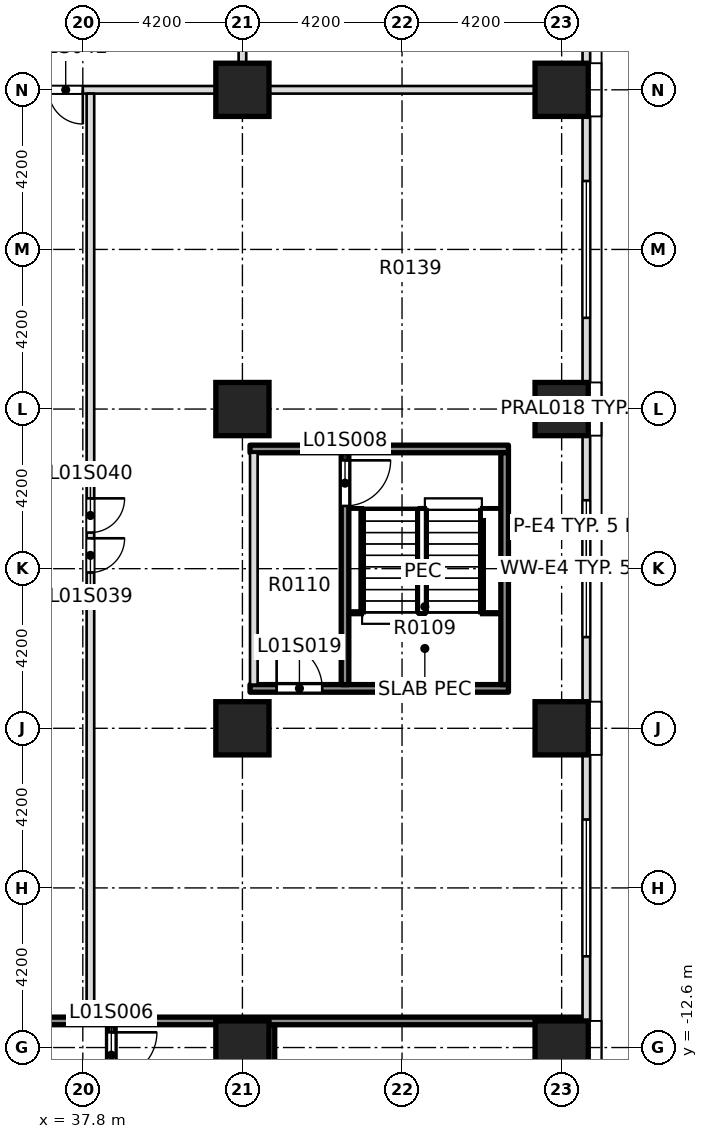
"""IFC4 building model, lengths in metres.
Left out: names, types, materials, properties, quantities, classifications, styles, units other than length and angle.
Written with IfcOpenShell. Run it as: python <this file> out.ifc"""

import sys

from ifc_helpers import new_model, si_unit, direction, frame, frame_2d, origin, origin_2d, place, context, subcontext, project, spatial, rectangle, extrude, element, fill, save


model = new_model("IFC4")
c1 = context("Model", 3, precision=1e-05, world=origin(), true_north=direction((0.0, 1.0)))
c2 = subcontext(c1, "Body", "Model", "MODEL_VIEW")
j1 = project(units=[si_unit("LENGTHUNIT", "METRE"), si_unit("PLANEANGLEUNIT", "RADIAN")], contexts=[c1])
p1 = place(None, origin())
s1 = spatial("IfcSite", under=j1, at=p1, CompositionType="ELEMENT")
p2 = place(p1, origin())
s2 = spatial("IfcBuilding", under=s1, at=p2, CompositionType="ELEMENT")
p3 = place(p2, frame((0.0, 0.0, 7.5)))
s3 = spatial("IfcBuildingStorey", under=s2, at=p3, CompositionType="ELEMENT", Elevation=7.5)
p4 = place(p3, frame((42.0, -12.6, 0.0), z_axis=(0.0, 0.0, 1.0), x_axis=(1.0, 0.0, 0.0)))
e1 = element("IfcColumn", 1, at=p4, inside=s3, PredefinedType="COLUMN", context=c2, shape_type="SweptSolid", body=[
    extrude(rectangle(XDim=1.4, YDim=1.4, at=origin_2d()), origin(), (0.0, 0.0, 1.0), 4.6),
])
p5 = place(p3, frame((50.4, -12.6, 0.0), z_axis=(0.0, 0.0, 1.0), x_axis=(1.0, 0.0, 0.0)))
e2 = element("IfcColumn", 2, at=p5, inside=s3, PredefinedType="COLUMN", context=c2, shape_type="SweptSolid", body=[
    extrude(rectangle(XDim=1.4, YDim=1.4, at=origin_2d()), origin(), (0.0, 0.0, 1.0), 5.0),
])
p6 = place(p3, frame((42.0, -4.2, 0.0), z_axis=(0.0, 0.0, 1.0), x_axis=(1.0, 0.0, 0.0)))
e3 = element("IfcColumn", 3, at=p6, inside=s3, PredefinedType="COLUMN", context=c2, shape_type="SweptSolid", body=[
    extrude(rectangle(XDim=1.4, YDim=1.4, at=origin_2d()), origin(), (0.0, 0.0, 1.0), 4.6),
])
p7 = place(p3, frame((50.4, -4.2, 0.0), z_axis=(0.0, 0.0, 1.0), x_axis=(1.0, 0.0, 0.0)))
e4 = element("IfcColumn", 4, at=p7, inside=s3, PredefinedType="COLUMN", context=c2, shape_type="SweptSolid", body=[
    extrude(rectangle(XDim=1.4, YDim=1.4, at=origin_2d()), origin(), (0.0, 0.0, 1.0), 5.0),
])
p8 = place(p3, frame((42.0, 4.2, 0.0), z_axis=(0.0, 0.0, 1.0), x_axis=(1.0, 0.0, 0.0)))
e5 = element("IfcColumn", 5, at=p8, inside=s3, PredefinedType="COLUMN", context=c2, shape_type="SweptSolid", body=[
    extrude(rectangle(XDim=1.4, YDim=1.4, at=origin_2d()), origin(), (0.0, 0.0, 1.0), 4.6),
])
p9 = place(p3, frame((50.4, 4.2, 0.0), z_axis=(0.0, 0.0, 1.0), x_axis=(1.0, 0.0, 0.0)))
e6 = element("IfcColumn", 6, at=p9, inside=s3, PredefinedType="COLUMN", context=c2, shape_type="SweptSolid", body=[
    extrude(rectangle(XDim=1.4, YDim=1.4, at=origin_2d()), origin(), (0.0, 0.0, 1.0), 5.0),
])
p10 = place(p3, frame((42.0, 12.6, 0.0), z_axis=(0.0, 0.0, 1.0), x_axis=(1.0, 0.0, 0.0)))
e7 = element("IfcColumn", 7, at=p10, inside=s3, PredefinedType="COLUMN", context=c2, shape_type="SweptSolid", body=[
    extrude(rectangle(XDim=1.4, YDim=1.4, at=origin_2d()), origin(), (0.0, 0.0, 1.0), 4.6),
])
p11 = place(p3, frame((50.4, 12.6, 0.0), z_axis=(0.0, 0.0, 1.0), x_axis=(1.0, 0.0, 0.0)))
e8 = element("IfcColumn", 8, at=p11, inside=s3, PredefinedType="COLUMN", context=c2, shape_type="SweptSolid", body=[
    extrude(rectangle(XDim=1.4, YDim=1.4, at=origin_2d()), origin(), (0.0, 0.0, 1.0), 5.0),
])
p12 = place(p3, frame((42.2, -3.15, 0.0), z_axis=(0.0, 0.0, 1.0), x_axis=(1.0, 0.0, 0.0)))
e9 = element("IfcWall", 9, at=p12, inside=s3, PredefinedType="SOLIDWALL", context=c2, shape_type="SweptSolid", body=[
    extrude(rectangle(XDim=6.8, YDim=0.2, at=frame_2d((3.4, 0.0))), origin(), (0.0, 0.0, 1.0), 4.6),
])
p13 = place(p12, frame((0.7, 0.0, 0.0)))
e10 = element("IfcOpeningElement", 10, at=p13, cuts=e9, PredefinedType="OPENING", context=c2, shape_type="SweptSolid", body=[
    extrude(rectangle(XDim=1.2, YDim=2.1, at=frame_2d((0.6, 1.05))), frame((0.0, 0.11, 0.0), z_axis=(0.0, -1.0, 0.0), x_axis=(1.0, 0.0, 0.0)), (0.0, 0.0, 1.0), 0.22),
])
p14 = place(p3, frame((42.2, 3.15, 0.0), z_axis=(0.0, 0.0, 1.0), x_axis=(1.0, 0.0, 0.0)))
e11 = element("IfcWall", 11, at=p14, inside=s3, PredefinedType="SOLIDWALL", context=c2, shape_type="SweptSolid", body=[
    extrude(rectangle(XDim=6.8, YDim=0.2, at=frame_2d((3.4, 0.0))), origin(), (0.0, 0.0, 1.0), 4.6),
])
p15 = place(p3, frame((16.875, 12.6, 0.0), z_axis=(0.0, 0.0, 1.0), x_axis=(1.0, 0.0, 0.0)))
e12 = element("IfcWall", 12, at=p15, inside=s3, PredefinedType="PARTITIONING", context=c2, shape_type="SweptSolid", body=[
    extrude(rectangle(XDim=34.075, YDim=0.2, at=frame_2d((17.038, 0.0))), origin(), (0.0, 0.0, 1.0), 4.6),
])
p16 = place(p15, frame((20.025, 0.0, 0.0)))
e13 = element("IfcOpeningElement", 13, at=p16, cuts=e12, PredefinedType="OPENING", context=c2, shape_type="SweptSolid", body=[
    extrude(rectangle(XDim=0.9, YDim=2.1, at=frame_2d((0.45, 1.05))), frame((0.0, 0.11, 0.0), z_axis=(0.0, -1.0, 0.0), x_axis=(1.0, 0.0, 0.0)), (0.0, 0.0, 1.0), 0.22),
])
p17 = place(p3, frame((38.0, -11.8, 0.0), z_axis=(0.0, 0.0, 1.0), x_axis=(0.0, 1.0, 0.0)))
e14 = element("IfcWall", 14, at=p17, inside=s3, PredefinedType="PARTITIONING", context=c2, shape_type="SweptSolid", body=[
    extrude(rectangle(XDim=24.3, YDim=0.2, at=frame_2d((12.15, 0.0))), origin(), (0.0, 0.0, 1.0), 4.6),
])
p18 = place(p17, frame((11.7, 0.0, 0.0)))
e15 = element("IfcOpeningElement", 15, at=p18, cuts=e14, PredefinedType="OPENING", context=c2, shape_type="SweptSolid", body=[
    extrude(rectangle(XDim=0.9, YDim=2.1, at=frame_2d((0.45, 1.05))), frame((0.0, 0.11, 0.0), z_axis=(0.0, -1.0, 0.0), x_axis=(1.0, 0.0, 0.0)), (0.0, 0.0, 1.0), 0.22),
])
p19 = place(p17, frame((12.75, 0.0, 0.0)))
e16 = element("IfcOpeningElement", 16, at=p19, cuts=e14, PredefinedType="OPENING", context=c2, shape_type="SweptSolid", body=[
    extrude(rectangle(XDim=0.9, YDim=2.1, at=frame_2d((0.45, 1.05))), frame((0.0, 0.11, 0.0), z_axis=(0.0, -1.0, 0.0), x_axis=(1.0, 0.0, 0.0)), (0.0, 0.0, 1.0), 0.22),
])
p20 = place(p3, frame((38.55, -19.125, 0.0), z_axis=(0.0, 0.0, 1.0), x_axis=(0.0, 1.0, 0.0)))
e17 = element("IfcWall", 17, at=p20, inside=s3, PredefinedType="SOLIDWALL", context=c2, shape_type="SweptSolid", body=[
    extrude(rectangle(XDim=7.125, YDim=0.2, at=frame_2d((3.562, 0.0))), origin(), (0.0, 0.0, 1.0), 4.6),
])
p21 = place(p20, frame((5.725, 0.0, 0.0)))
e18 = element("IfcOpeningElement", 18, at=p21, cuts=e17, PredefinedType="OPENING", context=c2, shape_type="SweptSolid", body=[
    extrude(rectangle(XDim=1.2, YDim=2.1, at=frame_2d((0.6, 1.05))), frame((0.0, 0.11, 0.0), z_axis=(0.0, -1.0, 0.0), x_axis=(1.0, 0.0, 0.0)), (0.0, 0.0, 1.0), 0.22),
])
p22 = place(p3, frame((42.0, 12.7, 0.0), z_axis=(0.0, 0.0, 1.0), x_axis=(0.0, 1.0, 0.0)))
e19 = element("IfcWall", 19, at=p22, inside=s3, PredefinedType="PARTITIONING", context=c2, shape_type="SweptSolid", body=[
    extrude(rectangle(XDim=8.525, YDim=0.2, at=frame_2d((4.263, 0.0))), origin(), (0.0, 0.0, 1.0), 4.6),
])
p23 = place(p22, frame((3.812, 0.0, 0.0)))
e20 = element("IfcOpeningElement", 20, at=p23, cuts=e19, PredefinedType="OPENING", context=c2, shape_type="SweptSolid", body=[
    extrude(rectangle(XDim=0.9, YDim=2.1, at=frame_2d((0.45, 1.05))), frame((0.0, 0.11, 0.0), z_axis=(0.0, -1.0, 0.0), x_axis=(1.0, 0.0, 0.0)), (0.0, 0.0, 1.0), 0.22),
])
p24 = place(p3, frame((42.3, -3.05, 0.0), z_axis=(0.0, 0.0, 1.0), x_axis=(0.0, 1.0, 0.0)))
e21 = element("IfcWall", 21, at=p24, inside=s3, PredefinedType="PARTITIONING", context=c2, shape_type="SweptSolid", body=[
    extrude(rectangle(XDim=6.1, YDim=0.2, at=frame_2d((3.05, 0.0))), origin(), (0.0, 0.0, 1.0), 4.6),
])
p25 = place(p3, frame((42.75, -18.125, 0.0), z_axis=(0.0, 0.0, 1.0), x_axis=(0.0, 1.0, 0.0)))
e22 = element("IfcWall", 22, at=p25, inside=s3, PredefinedType="SOLIDWALL", context=c2, shape_type="SweptSolid", body=[
    extrude(rectangle(XDim=6.125, YDim=0.2, at=frame_2d((3.062, 0.0))), origin(), (0.0, 0.0, 1.0), 4.6),
])
p26 = place(p3, frame((44.7, -3.05, 0.0), z_axis=(0.0, 0.0, 1.0), x_axis=(0.0, 1.0, 0.0)))
e23 = element("IfcWall", 23, at=p26, inside=s3, PredefinedType="SOLIDWALL", context=c2, shape_type="SweptSolid", body=[
    extrude(rectangle(XDim=6.1, YDim=0.2, at=frame_2d((3.05, 0.0))), origin(), (0.0, 0.0, 1.0), 4.6),
])
p27 = place(p26, frame((4.7, 0.0, 0.0)))
e24 = element("IfcOpeningElement", 24, at=p27, cuts=e23, PredefinedType="OPENING", context=c2, shape_type="SweptSolid", body=[
    extrude(rectangle(XDim=1.2, YDim=2.1, at=frame_2d((0.6, 1.05))), frame((0.0, 0.11, 0.0), z_axis=(0.0, -1.0, 0.0), x_axis=(1.0, 0.0, 0.0)), (0.0, 0.0, 1.0), 0.22),
])
p28 = place(p3, frame((48.9, -3.05, 0.0), z_axis=(0.0, 0.0, 1.0), x_axis=(0.0, 1.0, 0.0)))
e25 = element("IfcWall", 25, at=p28, inside=s3, PredefinedType="SOLIDWALL", context=c2, shape_type="SweptSolid", body=[
    extrude(rectangle(XDim=6.1, YDim=0.2, at=frame_2d((3.05, 0.0))), origin(), (0.0, 0.0, 1.0), 4.6),
])
p29 = place(p3, frame((51.05, -11.9, 0.0), z_axis=(0.0, 0.0, 1.0), x_axis=(0.0, 1.0, 0.0)))
e26 = element("IfcWall", 26, at=p29, inside=s3, PredefinedType="STANDARD", context=c2, shape_type="SweptSolid", body=[
    extrude(rectangle(XDim=7.0, YDim=0.2, at=frame_2d((3.5, 0.0))), origin(), (0.0, 0.0, 1.0), 4.6),
])
p30 = place(p29, frame((1.7, 0.0, 0.9)))
e27 = element("IfcOpeningElement", 27, at=p30, cuts=e26, PredefinedType="OPENING", context=c2, shape_type="SweptSolid", body=[
    extrude(rectangle(XDim=3.6, YDim=2.8, at=frame_2d((1.8, 1.4))), frame((0.0, 0.11, 0.0), z_axis=(0.0, -1.0, 0.0), x_axis=(1.0, 0.0, 0.0)), (0.0, 0.0, 1.0), 0.22),
])
p31 = place(p3, frame((51.05, -3.5, 0.0), z_axis=(0.0, 0.0, 1.0), x_axis=(0.0, 1.0, 0.0)))
e28 = element("IfcWall", 28, at=p31, inside=s3, PredefinedType="STANDARD", context=c2, shape_type="SweptSolid", body=[
    extrude(rectangle(XDim=7.0, YDim=0.2, at=frame_2d((3.5, 0.0))), origin(), (0.0, 0.0, 1.0), 4.6),
])
p32 = place(p31, frame((1.7, 0.0, 0.9)))
e29 = element("IfcOpeningElement", 29, at=p32, cuts=e28, PredefinedType="OPENING", context=c2, shape_type="SweptSolid", body=[
    extrude(rectangle(XDim=3.6, YDim=2.8, at=frame_2d((1.8, 1.4))), frame((0.0, 0.11, 0.0), z_axis=(0.0, -1.0, 0.0), x_axis=(1.0, 0.0, 0.0)), (0.0, 0.0, 1.0), 0.22),
])
p33 = place(p3, frame((51.05, 4.9, 0.0), z_axis=(0.0, 0.0, 1.0), x_axis=(0.0, 1.0, 0.0)))
e30 = element("IfcWall", 30, at=p33, inside=s3, PredefinedType="STANDARD", context=c2, shape_type="SweptSolid", body=[
    extrude(rectangle(XDim=7.0, YDim=0.2, at=frame_2d((3.5, 0.0))), origin(), (0.0, 0.0, 1.0), 4.6),
])
p34 = place(p33, frame((1.7, 0.0, 0.9)))
e31 = element("IfcOpeningElement", 31, at=p34, cuts=e30, PredefinedType="OPENING", context=c2, shape_type="SweptSolid", body=[
    extrude(rectangle(XDim=3.6, YDim=2.8, at=frame_2d((1.8, 1.4))), frame((0.0, 0.11, 0.0), z_axis=(0.0, -1.0, 0.0), x_axis=(1.0, 0.0, 0.0)), (0.0, 0.0, 1.0), 0.22),
])
p35 = place(p3, frame((51.05, 13.3, 0.0), z_axis=(0.0, 0.0, 1.0), x_axis=(0.0, 1.0, 0.0)))
e32 = element("IfcWall", 32, at=p35, inside=s3, PredefinedType="STANDARD", context=c2, shape_type="SweptSolid", body=[
    extrude(rectangle(XDim=7.0, YDim=0.2, at=frame_2d((3.5, 0.0))), origin(), (0.0, 0.0, 1.0), 4.6),
])
p36 = place(p35, frame((1.7, 0.0, 0.9)))
e33 = element("IfcOpeningElement", 33, at=p36, cuts=e32, PredefinedType="OPENING", context=c2, shape_type="SweptSolid", body=[
    extrude(rectangle(XDim=3.6, YDim=2.8, at=frame_2d((1.8, 1.4))), frame((0.0, 0.11, 0.0), z_axis=(0.0, -1.0, 0.0), x_axis=(1.0, 0.0, 0.0)), (0.0, 0.0, 1.0), 0.22),
])
p37 = place(p3, frame((16.875, -11.9, 0.0), z_axis=(0.0, 0.0, 1.0), x_axis=(1.0, 0.0, 0.0)))
e34 = element("IfcWall", 34, at=p37, inside=s3, PredefinedType="SOLIDWALL", context=c2, shape_type="SweptSolid", body=[
    extrude(rectangle(XDim=34.075, YDim=0.2, at=frame_2d((17.038, 0.0))), origin(), (0.0, 0.0, 1.0), 4.6),
])
p38 = place(p21, origin())
e35 = element("IfcDoor", 35, at=p38, inside=s3, OperationType="DOUBLE_DOOR_SINGLE_SWING", PredefinedType="DOOR", context=c2, shape_type="SweptSolid", body=[
    extrude(rectangle(XDim=1.2, YDim=2.1, at=frame_2d((0.6, 1.05))), frame((0.0, 0.025, 0.0), z_axis=(0.0, -1.0, 0.0), x_axis=(1.0, 0.0, 0.0)), (0.0, 0.0, 1.0), 0.05),
])
fill(e18, e35)
p39 = place(p27, origin())
e36 = element("IfcDoor", 36, at=p39, inside=s3, OperationType="DOUBLE_DOOR_SINGLE_SWING", PredefinedType="DOOR", context=c2, shape_type="SweptSolid", body=[
    extrude(rectangle(XDim=1.2, YDim=2.1, at=frame_2d((0.6, 1.05))), frame((0.0, 0.025, 0.0), z_axis=(0.0, -1.0, 0.0), x_axis=(1.0, 0.0, 0.0)), (0.0, 0.0, 1.0), 0.05),
])
fill(e24, e36)
p40 = place(p13, origin())
e37 = element("IfcDoor", 37, at=p40, inside=s3, OperationType="SINGLE_SWING_LEFT", PredefinedType="DOOR", context=c2, shape_type="SweptSolid", body=[
    extrude(rectangle(XDim=1.2, YDim=2.1, at=frame_2d((0.6, 1.05))), frame((0.0, 0.025, 0.0), z_axis=(0.0, -1.0, 0.0), x_axis=(1.0, 0.0, 0.0)), (0.0, 0.0, 1.0), 0.05),
])
fill(e10, e37)
p41 = place(p18, origin())
e38 = element("IfcDoor", 38, at=p41, inside=s3, OperationType="SINGLE_SWING_RIGHT", PredefinedType="DOOR", context=c2, shape_type="SweptSolid", body=[
    extrude(rectangle(XDim=0.9, YDim=2.1, at=frame_2d((0.45, 1.05))), frame((0.0, 0.025, 0.0), z_axis=(0.0, -1.0, 0.0), x_axis=(1.0, 0.0, 0.0)), (0.0, 0.0, 1.0), 0.05),
])
fill(e15, e38)
p42 = place(p19, origin())
e39 = element("IfcDoor", 39, at=p42, inside=s3, OperationType="SINGLE_SWING_RIGHT", PredefinedType="DOOR", context=c2, shape_type="SweptSolid", body=[
    extrude(rectangle(XDim=0.9, YDim=2.1, at=frame_2d((0.45, 1.05))), frame((0.0, 0.025, 0.0), z_axis=(0.0, -1.0, 0.0), x_axis=(1.0, 0.0, 0.0)), (0.0, 0.0, 1.0), 0.05),
])
fill(e16, e39)
p43 = place(p16, origin())
e40 = element("IfcDoor", 40, at=p43, inside=s3, OperationType="SINGLE_SWING_RIGHT", PredefinedType="DOOR", context=c2, shape_type="SweptSolid", body=[
    extrude(rectangle(XDim=0.9, YDim=2.1, at=frame_2d((0.45, 1.05))), frame((0.0, 0.025, 0.0), z_axis=(0.0, -1.0, 0.0), x_axis=(1.0, 0.0, 0.0)), (0.0, 0.0, 1.0), 0.05),
])
fill(e13, e40)
p44 = place(p30, origin())
e41 = element("IfcWindow", 41, at=p44, inside=s3, PartitioningType="SINGLE_PANEL", PredefinedType="WINDOW", context=c2, shape_type="SweptSolid", body=[
    extrude(rectangle(XDim=3.6, YDim=2.8, at=frame_2d((1.8, 1.4))), frame((0.0, 0.03, 0.0), z_axis=(0.0, -1.0, 0.0), x_axis=(1.0, 0.0, 0.0)), (0.0, 0.0, 1.0), 0.06),
])
fill(e27, e41)
p45 = place(p32, origin())
e42 = element("IfcWindow", 42, at=p45, inside=s3, PartitioningType="SINGLE_PANEL", PredefinedType="WINDOW", context=c2, shape_type="SweptSolid", body=[
    extrude(rectangle(XDim=3.6, YDim=2.8, at=frame_2d((1.8, 1.4))), frame((0.0, 0.03, 0.0), z_axis=(0.0, -1.0, 0.0), x_axis=(1.0, 0.0, 0.0)), (0.0, 0.0, 1.0), 0.06),
])
fill(e29, e42)
p46 = place(p34, origin())
e43 = element("IfcWindow", 43, at=p46, inside=s3, PartitioningType="SINGLE_PANEL", PredefinedType="WINDOW", context=c2, shape_type="SweptSolid", body=[
    extrude(rectangle(XDim=3.6, YDim=2.8, at=frame_2d((1.8, 1.4))), frame((0.0, 0.03, 0.0), z_axis=(0.0, -1.0, 0.0), x_axis=(1.0, 0.0, 0.0)), (0.0, 0.0, 1.0), 0.06),
])
fill(e31, e43)
save(model, sys.argv[1])
